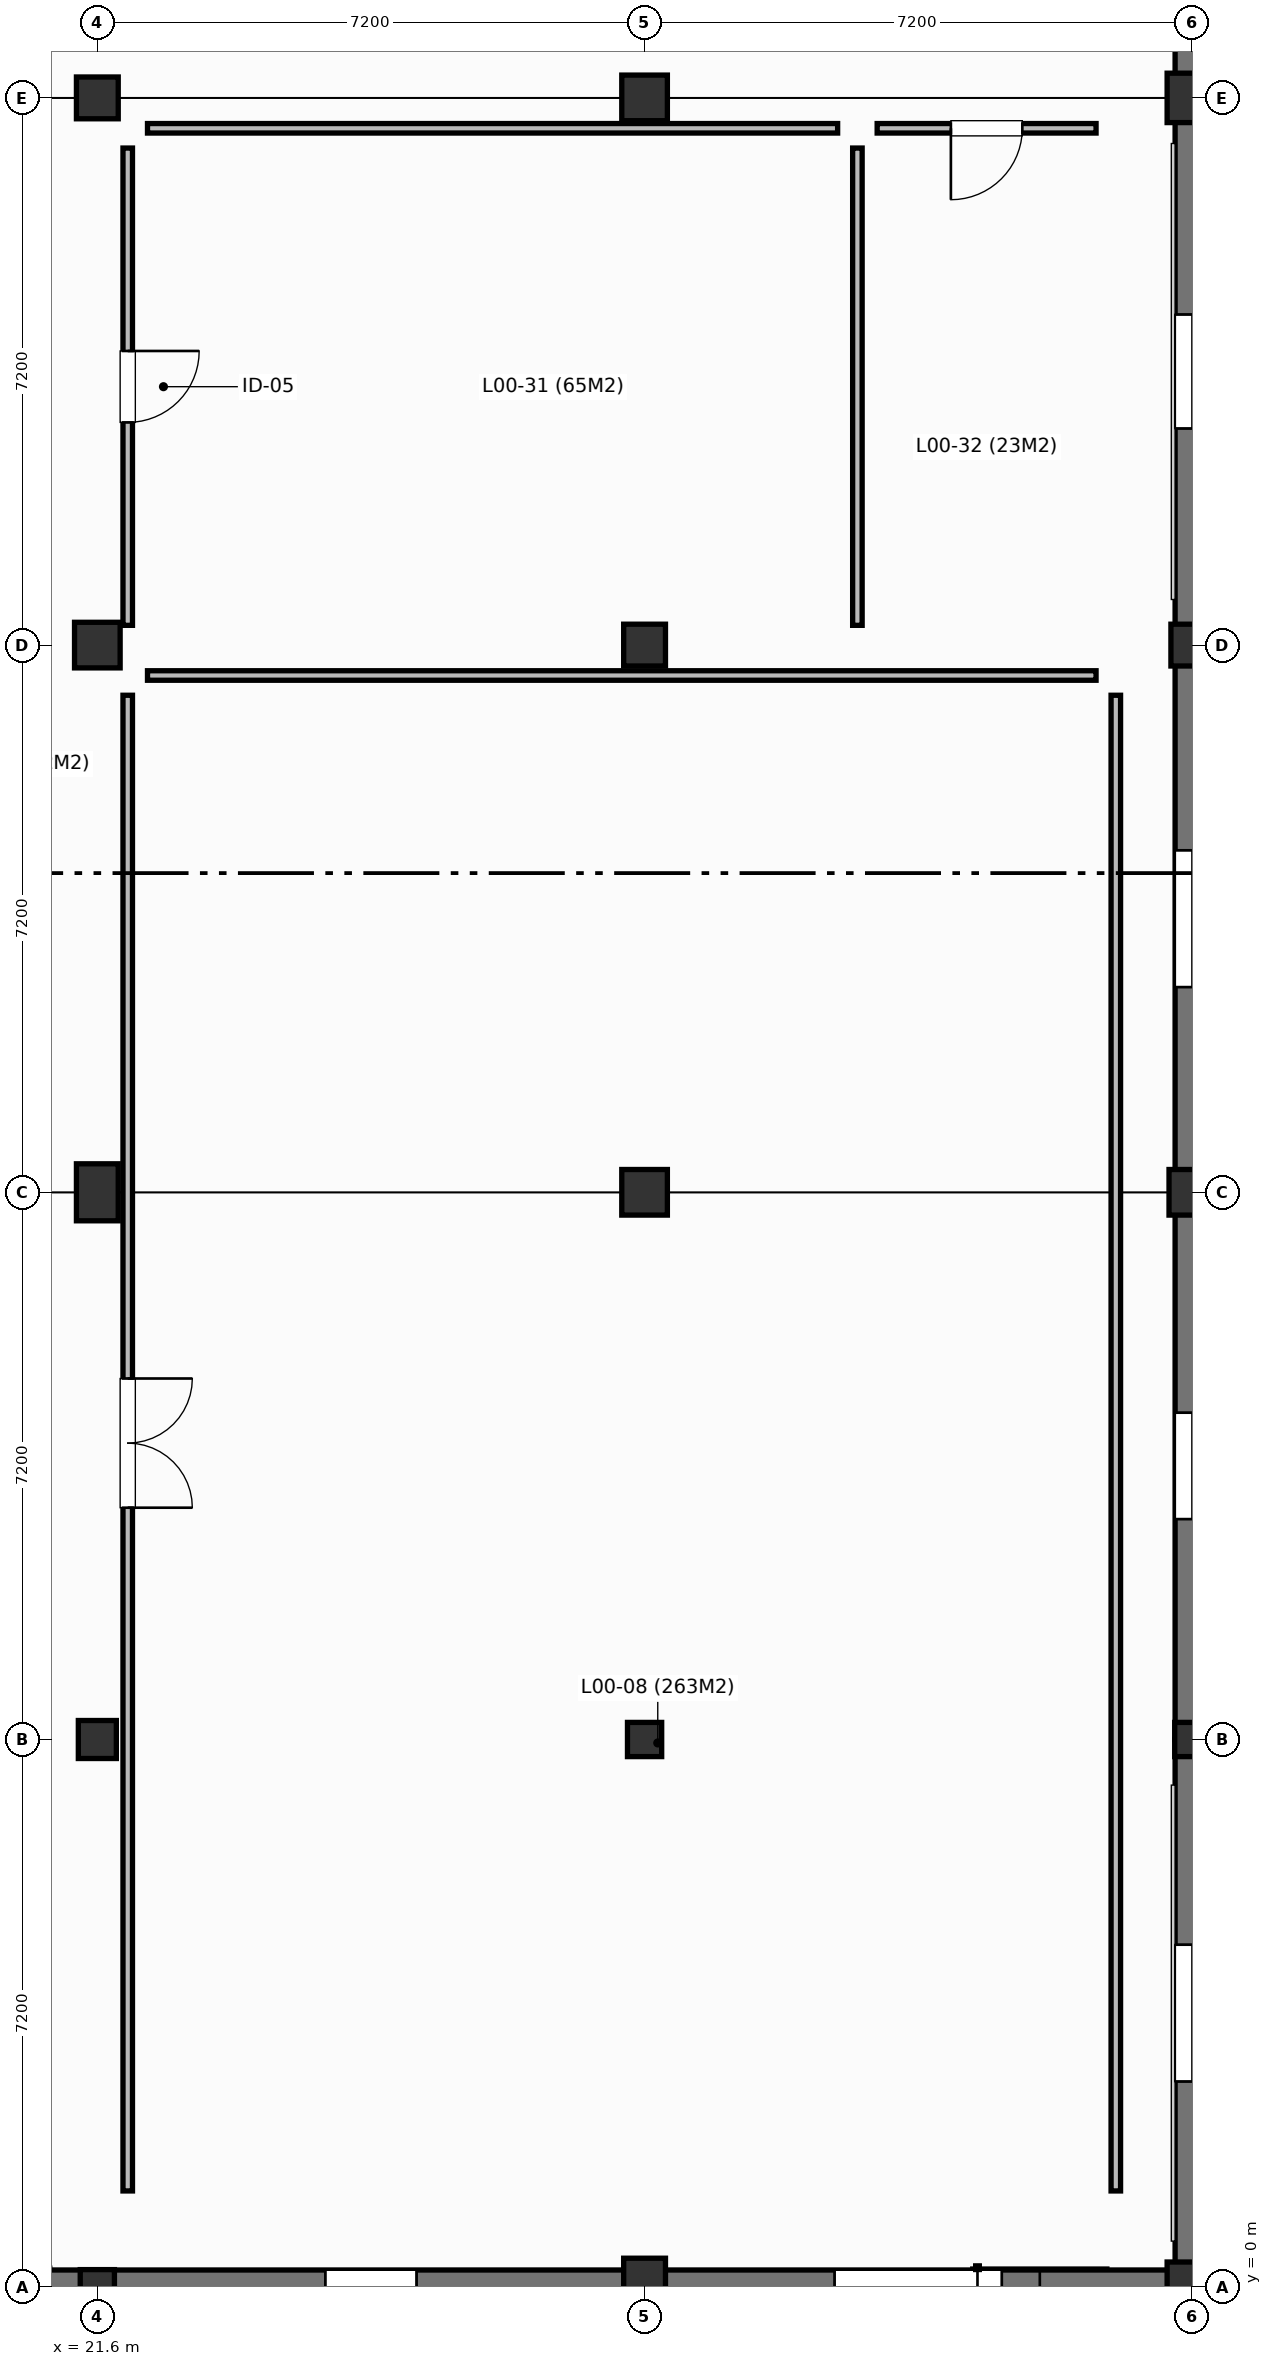
"""IFC4 building model, lengths in metres.
Left out: names, types, materials, properties, quantities, classifications, styles, units other than length and angle.
Written with IfcOpenShell. Run it as: python <this file> out.ifc"""

import sys

from ifc_helpers import new_model, si_unit, direction, frame, frame_2d, origin, origin_2d, place, context, subcontext, project, spatial, rectangle, circle, extrude, element, fill, save


model = new_model("IFC4")
c1 = context("Model", 3, precision=1e-05, world=origin(), true_north=direction((0.0, 1.0)))
c2 = subcontext(c1, "Body", "Model", "MODEL_VIEW")
j1 = project(units=[si_unit("LENGTHUNIT", "METRE"), si_unit("PLANEANGLEUNIT", "RADIAN")], contexts=[c1])
p1 = place(None, origin())
s1 = spatial("IfcSite", under=j1, at=p1, CompositionType="ELEMENT")
p2 = place(p1, origin())
s2 = spatial("IfcBuilding", under=s1, at=p2, CompositionType="ELEMENT")
p3 = place(p2, origin())
s3 = spatial("IfcBuildingStorey", under=s2, at=p3, CompositionType="ELEMENT", Elevation=0.0)
p4 = place(p3, frame((21.6, 0.0, 0.0), z_axis=(0.0, 0.0, 1.0), x_axis=(1.0, 0.0, 0.0)))
e1 = element("IfcColumn", 1, at=p4, inside=s3, PredefinedType="COLUMN", context=c2, shape_type="SweptSolid", body=[
    extrude(rectangle(XDim=0.45, YDim=0.45, at=origin_2d()), origin(), (0.0, 0.0, 1.0), 4.8),
])
p5 = place(p3, frame((21.6, 7.2, 0.0), z_axis=(0.0, 0.0, 1.0), x_axis=(1.0, 0.0, 0.0)))
e2 = element("IfcColumn", 2, at=p5, inside=s3, PredefinedType="COLUMN", context=c2, shape_type="SweptSolid", body=[
    extrude(rectangle(XDim=0.5, YDim=0.5, at=origin_2d()), origin(), (0.0, 0.0, 1.0), 4.8),
])
p6 = place(p3, frame((21.6, 14.4, 0.0), z_axis=(0.0, 0.0, 1.0), x_axis=(1.0, 0.0, 0.0)))
e3 = element("IfcColumn", 3, at=p6, inside=s3, PredefinedType="COLUMN", context=c2, shape_type="SweptSolid", body=[
    extrude(rectangle(XDim=0.55, YDim=0.75, at=origin_2d()), origin(), (0.0, 0.0, 1.0), 4.8),
])
p7 = place(p3, frame((21.6, 21.6, 0.0), z_axis=(0.0, 0.0, 1.0), x_axis=(1.0, 0.0, 0.0)))
e4 = element("IfcColumn", 4, at=p7, inside=s3, PredefinedType="COLUMN", context=c2, shape_type="SweptSolid", body=[
    extrude(rectangle(XDim=0.6, YDim=0.6, at=origin_2d()), origin(), (0.0, 0.0, 1.0), 4.8),
])
p8 = place(p3, frame((21.6, 28.8, 0.0), z_axis=(0.0, 0.0, 1.0), x_axis=(1.0, 0.0, 0.0)))
e5 = element("IfcColumn", 5, at=p8, inside=s3, PredefinedType="COLUMN", context=c2, shape_type="SweptSolid", body=[
    extrude(rectangle(XDim=0.55, YDim=0.55, at=origin_2d()), origin(), (0.0, 0.0, 1.0), 4.8),
])
p9 = place(p3, frame((28.8, 0.0, 0.0), z_axis=(0.0, 0.0, 1.0), x_axis=(1.0, 0.0, 0.0)))
e6 = element("IfcColumn", 6, at=p9, inside=s3, PredefinedType="COLUMN", context=c2, shape_type="SweptSolid", body=[
    extrude(rectangle(XDim=0.55, YDim=0.75, at=origin_2d()), origin(), (0.0, 0.0, 1.0), 4.8),
])
p10 = place(p3, frame((28.8, 7.2, 0.0), z_axis=(0.0, 0.0, 1.0), x_axis=(1.0, 0.0, 0.0)))
e7 = element("IfcColumn", 7, at=p10, inside=s3, PredefinedType="COLUMN", context=c2, shape_type="SweptSolid", body=[
    extrude(rectangle(XDim=0.45, YDim=0.45, at=origin_2d()), origin(), (0.0, 0.0, 1.0), 4.8),
])
p11 = place(p3, frame((28.8, 14.4, 0.0), z_axis=(0.0, 0.0, 1.0), x_axis=(1.0, 0.0, 0.0)))
e8 = element("IfcColumn", 8, at=p11, inside=s3, PredefinedType="COLUMN", context=c2, shape_type="SweptSolid", body=[
    extrude(rectangle(XDim=0.6, YDim=0.6, at=origin_2d()), origin(), (0.0, 0.0, 1.0), 4.8),
])
p12 = place(p3, frame((28.8, 21.6, 0.0), z_axis=(0.0, 0.0, 1.0), x_axis=(1.0, 0.0, 0.0)))
e9 = element("IfcColumn", 9, at=p12, inside=s3, PredefinedType="COLUMN", context=c2, shape_type="SweptSolid", body=[
    extrude(rectangle(XDim=0.55, YDim=0.55, at=origin_2d()), origin(), (0.0, 0.0, 1.0), 4.8),
])
p13 = place(p3, frame((28.8, 28.8, 0.0), z_axis=(0.0, 0.0, 1.0), x_axis=(1.0, 0.0, 0.0)))
e10 = element("IfcColumn", 10, at=p13, inside=s3, PredefinedType="COLUMN", context=c2, shape_type="SweptSolid", body=[
    extrude(rectangle(XDim=0.6, YDim=0.6, at=origin_2d()), origin(), (0.0, 0.0, 1.0), 4.8),
])
p14 = place(p3, frame((36.0, 0.0, 0.0), z_axis=(0.0, 0.0, 1.0), x_axis=(1.0, 0.0, 0.0)))
e11 = element("IfcColumn", 11, at=p14, inside=s3, PredefinedType="COLUMN", context=c2, shape_type="SweptSolid", body=[
    extrude(circle(Radius=0.325, at=origin_2d()), origin(), (0.0, 0.0, 1.0), 4.8),
])
p15 = place(p3, frame((36.0, 7.2, 0.0), z_axis=(0.0, 0.0, 1.0), x_axis=(1.0, 0.0, 0.0)))
e12 = element("IfcColumn", 12, at=p15, inside=s3, PredefinedType="COLUMN", context=c2, shape_type="SweptSolid", body=[
    extrude(rectangle(XDim=0.45, YDim=0.45, at=origin_2d()), origin(), (0.0, 0.0, 1.0), 4.8),
])
p16 = place(p3, frame((36.0, 14.4, 0.0), z_axis=(0.0, 0.0, 1.0), x_axis=(1.0, 0.0, 0.0)))
e13 = element("IfcColumn", 13, at=p16, inside=s3, PredefinedType="COLUMN", context=c2, shape_type="SweptSolid", body=[
    extrude(rectangle(XDim=0.6, YDim=0.6, at=origin_2d()), origin(), (0.0, 0.0, 1.0), 4.8),
])
p17 = place(p3, frame((36.0, 21.6, 0.0), z_axis=(0.0, 0.0, 1.0), x_axis=(1.0, 0.0, 0.0)))
e14 = element("IfcColumn", 14, at=p17, inside=s3, PredefinedType="COLUMN", context=c2, shape_type="SweptSolid", body=[
    extrude(rectangle(XDim=0.55, YDim=0.55, at=origin_2d()), origin(), (0.0, 0.0, 1.0), 4.8),
])
p18 = place(p3, frame((36.0, 28.8, 0.0), z_axis=(0.0, 0.0, 1.0), x_axis=(1.0, 0.0, 0.0)))
e15 = element("IfcColumn", 15, at=p18, inside=s3, PredefinedType="COLUMN", context=c2, shape_type="SweptSolid", body=[
    extrude(circle(Radius=0.325, at=origin_2d()), origin(), (0.0, 0.0, 1.0), 4.8),
])
p19 = place(p3, frame((36.0, 36.0, 0.0), z_axis=(0.0, 0.0, 1.0), x_axis=(0.0, -1.0, 0.0)))
e16 = element("IfcWall", 16, at=p19, inside=s3, PredefinedType="STANDARD", context=c2, shape_type="SweptSolid", body=[
    extrude(rectangle(XDim=7.2, YDim=0.44, at=frame_2d((3.6, 0.0))), origin(), (0.0, 0.0, 1.0), 4.44),
])
p20 = place(p19, frame((3.0, 0.0, 0.8)))
e17 = element("IfcOpeningElement", 17, at=p20, cuts=e16, PredefinedType="OPENING", context=c2, shape_type="SweptSolid", body=[
    extrude(rectangle(XDim=1.2, YDim=1.65, at=frame_2d((0.6, 0.825))), frame((0.0, 0.23, 0.0), z_axis=(0.0, -1.0, 0.0), x_axis=(1.0, 0.0, 0.0)), (0.0, 0.0, 1.0), 0.46),
])
p21 = place(p3, frame((36.0, 28.8, 0.0), z_axis=(0.0, 0.0, 1.0), x_axis=(0.0, -1.0, 0.0)))
e18 = element("IfcWall", 18, at=p21, inside=s3, PredefinedType="STANDARD", context=c2, shape_type="SweptSolid", body=[
    extrude(rectangle(XDim=7.2, YDim=0.44, at=frame_2d((3.6, 0.0))), origin(), (0.0, 0.0, 1.0), 4.44),
])
p22 = place(p21, frame((2.85, 0.0, 0.8)))
e19 = element("IfcOpeningElement", 19, at=p22, cuts=e18, PredefinedType="OPENING", context=c2, shape_type="SweptSolid", body=[
    extrude(rectangle(XDim=1.5, YDim=1.65, at=frame_2d((0.75, 0.825))), frame((0.0, 0.23, 0.0), z_axis=(0.0, -1.0, 0.0), x_axis=(1.0, 0.0, 0.0)), (0.0, 0.0, 1.0), 0.46),
])
p23 = place(p3, frame((36.0, 21.6, 0.0), z_axis=(0.0, 0.0, 1.0), x_axis=(0.0, -1.0, 0.0)))
e20 = element("IfcWall", 20, at=p23, inside=s3, PredefinedType="STANDARD", context=c2, shape_type="SweptSolid", body=[
    extrude(rectangle(XDim=7.2, YDim=0.44, at=frame_2d((3.6, 0.0))), origin(), (0.0, 0.0, 1.0), 4.44),
])
p24 = place(p23, frame((2.7, 0.0, 0.8)))
e21 = element("IfcOpeningElement", 21, at=p24, cuts=e20, PredefinedType="OPENING", context=c2, shape_type="SweptSolid", body=[
    extrude(rectangle(XDim=1.8, YDim=1.65, at=frame_2d((0.9, 0.825))), frame((0.0, 0.23, 0.0), z_axis=(0.0, -1.0, 0.0), x_axis=(1.0, 0.0, 0.0)), (0.0, 0.0, 1.0), 0.46),
])
p25 = place(p3, frame((36.0, 14.4, 0.0), z_axis=(0.0, 0.0, 1.0), x_axis=(0.0, -1.0, 0.0)))
e22 = element("IfcWall", 22, at=p25, inside=s3, PredefinedType="STANDARD", context=c2, shape_type="SweptSolid", body=[
    extrude(rectangle(XDim=7.2, YDim=0.44, at=frame_2d((3.6, 0.0))), origin(), (0.0, 0.0, 1.0), 4.44),
])
p26 = place(p25, frame((2.9, 0.0, 0.8)))
e23 = element("IfcOpeningElement", 23, at=p26, cuts=e22, PredefinedType="OPENING", context=c2, shape_type="SweptSolid", body=[
    extrude(rectangle(XDim=1.4, YDim=2.05, at=frame_2d((0.7, 1.025))), frame((0.0, 0.23, 0.0), z_axis=(0.0, -1.0, 0.0), x_axis=(1.0, 0.0, 0.0)), (0.0, 0.0, 1.0), 0.46),
])
p27 = place(p3, frame((36.0, 7.2, 0.0), z_axis=(0.0, 0.0, 1.0), x_axis=(0.0, -1.0, 0.0)))
e24 = element("IfcWall", 24, at=p27, inside=s3, PredefinedType="STANDARD", context=c2, shape_type="SweptSolid", body=[
    extrude(rectangle(XDim=7.2, YDim=0.44, at=frame_2d((3.6, 0.0))), origin(), (0.0, 0.0, 1.0), 4.44),
])
p28 = place(p27, frame((2.7, 0.0, 0.8)))
e25 = element("IfcOpeningElement", 25, at=p28, cuts=e24, PredefinedType="OPENING", context=c2, shape_type="SweptSolid", body=[
    extrude(rectangle(XDim=1.8, YDim=2.05, at=frame_2d((0.9, 1.025))), frame((0.0, 0.23, 0.0), z_axis=(0.0, -1.0, 0.0), x_axis=(1.0, 0.0, 0.0)), (0.0, 0.0, 1.0), 0.46),
])
p29 = place(p3, frame((36.0, 0.0, 0.0), z_axis=(0.0, 0.0, 1.0), x_axis=(-1.0, 0.0, 0.0)))
e26 = element("IfcWall", 26, at=p29, inside=s3, PredefinedType="STANDARD", context=c2, shape_type="SweptSolid", body=[
    extrude(rectangle(XDim=7.2, YDim=0.44, at=frame_2d((3.6, 0.0))), origin(), (0.0, 0.0, 1.0), 4.44),
])
p30 = place(p29, frame((2.5, 0.0, 0.8)))
e27 = element("IfcOpeningElement", 27, at=p30, cuts=e26, PredefinedType="OPENING", context=c2, shape_type="SweptSolid", body=[
    extrude(rectangle(XDim=2.2, YDim=2.05, at=frame_2d((1.1, 1.025))), frame((0.0, 0.23, 0.0), z_axis=(0.0, -1.0, 0.0), x_axis=(1.0, 0.0, 0.0)), (0.0, 0.0, 1.0), 0.46),
])
p31 = place(p3, frame((28.8, 0.0, 0.0), z_axis=(0.0, 0.0, 1.0), x_axis=(-1.0, 0.0, 0.0)))
e28 = element("IfcWall", 28, at=p31, inside=s3, PredefinedType="STANDARD", context=c2, shape_type="SweptSolid", body=[
    extrude(rectangle(XDim=7.2, YDim=0.44, at=frame_2d((3.6, 0.0))), origin(), (0.0, 0.0, 1.0), 4.44),
])
p32 = place(p31, frame((3.0, 0.0, 0.8)))
e29 = element("IfcOpeningElement", 29, at=p32, cuts=e28, PredefinedType="OPENING", context=c2, shape_type="SweptSolid", body=[
    extrude(rectangle(XDim=1.2, YDim=1.65, at=frame_2d((0.6, 0.825))), frame((0.0, 0.23, 0.0), z_axis=(0.0, -1.0, 0.0), x_axis=(1.0, 0.0, 0.0)), (0.0, 0.0, 1.0), 0.46),
])
p33 = place(p3, frame((21.6, 0.0, 0.0), z_axis=(0.0, 0.0, 1.0), x_axis=(-1.0, 0.0, 0.0)))
e30 = element("IfcWall", 30, at=p33, inside=s3, PredefinedType="STANDARD", context=c2, shape_type="SweptSolid", body=[
    extrude(rectangle(XDim=7.2, YDim=0.44, at=frame_2d((3.6, 0.0))), origin(), (0.0, 0.0, 1.0), 4.44),
])
p34 = place(p33, frame((2.85, 0.0, 0.8)))
e31 = element("IfcOpeningElement", 31, at=p34, cuts=e30, PredefinedType="OPENING", context=c2, shape_type="SweptSolid", body=[
    extrude(rectangle(XDim=1.5, YDim=1.65, at=frame_2d((0.75, 0.825))), frame((0.0, 0.23, 0.0), z_axis=(0.0, -1.0, 0.0), x_axis=(1.0, 0.0, 0.0)), (0.0, 0.0, 1.0), 0.46),
])
p35 = place(p3, frame((35.0, 1.26, 0.0), z_axis=(0.0, 0.0, 1.0), x_axis=(0.0, 1.0, 0.0)))
e32 = element("IfcWall", 32, at=p35, inside=s3, PredefinedType="PARTITIONING", context=c2, shape_type="SweptSolid", body=[
    extrude(rectangle(XDim=19.68, YDim=0.125, at=frame_2d((9.84, 0.0))), origin(), (0.0, 0.0, 1.0), 4.44),
])
p36 = place(p3, frame((34.74, 21.2, 0.0), z_axis=(0.0, 0.0, 1.0), x_axis=(-1.0, 0.0, 0.0)))
e33 = element("IfcWall", 33, at=p36, inside=s3, PredefinedType="PARTITIONING", context=c2, shape_type="SweptSolid", body=[
    extrude(rectangle(XDim=12.48, YDim=0.125, at=frame_2d((6.24, 0.0))), origin(), (0.0, 0.0, 1.0), 3.515),
])
p37 = place(p3, frame((22.0, 20.94, 0.0), z_axis=(0.0, 0.0, 1.0), x_axis=(0.0, -1.0, 0.0)))
e34 = element("IfcWall", 34, at=p37, inside=s3, PredefinedType="PARTITIONING", context=c2, shape_type="SweptSolid", body=[
    extrude(rectangle(XDim=19.68, YDim=0.125, at=frame_2d((9.84, 0.0))), origin(), (0.0, 0.0, 1.0), 3.465),
])
p38 = place(p37, frame((8.99, 0.0, 0.0)))
e35 = element("IfcOpeningElement", 35, at=p38, cuts=e34, PredefinedType="OPENING", context=c2, shape_type="SweptSolid", body=[
    extrude(rectangle(XDim=1.7, YDim=2.2, at=frame_2d((0.85, 1.1))), frame((0.0, 0.073, 0.0), z_axis=(0.0, -1.0, 0.0), x_axis=(1.0, 0.0, 0.0)), (0.0, 0.0, 1.0), 0.145),
])
p39 = place(p3, frame((31.6, 21.86, 0.0), z_axis=(0.0, 0.0, 1.0), x_axis=(0.0, 1.0, 0.0)))
e36 = element("IfcWall", 36, at=p39, inside=s3, PredefinedType="PARTITIONING", context=c2, shape_type="SweptSolid", body=[
    extrude(rectangle(XDim=6.28, YDim=0.125, at=frame_2d((3.14, 0.0))), origin(), (0.0, 0.0, 1.0), 4.44),
])
p40 = place(p3, frame((31.34, 28.4, 0.0), z_axis=(0.0, 0.0, 1.0), x_axis=(-1.0, 0.0, 0.0)))
e37 = element("IfcWall", 37, at=p40, inside=s3, PredefinedType="PARTITIONING", context=c2, shape_type="SweptSolid", body=[
    extrude(rectangle(XDim=9.08, YDim=0.125, at=frame_2d((4.54, 0.0))), origin(), (0.0, 0.0, 1.0), 3.515),
])
p41 = place(p3, frame((22.0, 28.14, 0.0), z_axis=(0.0, 0.0, 1.0), x_axis=(0.0, -1.0, 0.0)))
e38 = element("IfcWall", 38, at=p41, inside=s3, PredefinedType="PARTITIONING", context=c2, shape_type="SweptSolid", body=[
    extrude(rectangle(XDim=6.28, YDim=0.125, at=frame_2d((3.14, 0.0))), origin(), (0.0, 0.0, 1.0), 3.365),
])
p42 = place(p41, frame((2.67, 0.0, 0.0)))
e39 = element("IfcOpeningElement", 39, at=p42, cuts=e38, PredefinedType="OPENING", context=c2, shape_type="SweptSolid", body=[
    extrude(rectangle(XDim=0.94, YDim=2.1, at=frame_2d((0.47, 1.05))), frame((0.0, 0.073, 0.0), z_axis=(0.0, -1.0, 0.0), x_axis=(1.0, 0.0, 0.0)), (0.0, 0.0, 1.0), 0.145),
])
p43 = place(p3, frame((34.74, 28.4, 0.0), z_axis=(0.0, 0.0, 1.0), x_axis=(-1.0, 0.0, 0.0)))
e40 = element("IfcWall", 40, at=p43, inside=s3, PredefinedType="PARTITIONING", context=c2, shape_type="SweptSolid", body=[
    extrude(rectangle(XDim=2.88, YDim=0.125, at=frame_2d((1.44, 0.0))), origin(), (0.0, 0.0, 1.0), 3.815),
])
p44 = place(p43, frame((0.97, 0.0, 0.0)))
e41 = element("IfcOpeningElement", 41, at=p44, cuts=e40, PredefinedType="OPENING", context=c2, shape_type="SweptSolid", body=[
    extrude(rectangle(XDim=0.94, YDim=2.1, at=frame_2d((0.47, 1.05))), frame((0.0, 0.073, 0.0), z_axis=(0.0, -1.0, 0.0), x_axis=(1.0, 0.0, 0.0)), (0.0, 0.0, 1.0), 0.145),
])
p45 = place(p22, origin())
e42 = element("IfcWindow", 42, at=p45, inside=s3, PartitioningType="SINGLE_PANEL", PredefinedType="WINDOW", context=c2, shape_type="SweptSolid", body=[
    extrude(rectangle(XDim=1.5, YDim=1.65, at=frame_2d((0.75, 0.825))), frame((0.0, 0.03, 0.0), z_axis=(0.0, -1.0, 0.0), x_axis=(1.0, 0.0, 0.0)), (0.0, 0.0, 1.0), 0.06),
])
fill(e19, e42)
p46 = place(p24, origin())
e43 = element("IfcWindow", 43, at=p46, inside=s3, PartitioningType="SINGLE_PANEL", PredefinedType="WINDOW", context=c2, shape_type="SweptSolid", body=[
    extrude(rectangle(XDim=1.8, YDim=1.65, at=frame_2d((0.9, 0.825))), frame((0.0, 0.03, 0.0), z_axis=(0.0, -1.0, 0.0), x_axis=(1.0, 0.0, 0.0)), (0.0, 0.0, 1.0), 0.06),
])
fill(e21, e43)
p47 = place(p26, origin())
e44 = element("IfcWindow", 44, at=p47, inside=s3, PartitioningType="SINGLE_PANEL", PredefinedType="WINDOW", context=c2, shape_type="SweptSolid", body=[
    extrude(rectangle(XDim=1.4, YDim=2.05, at=frame_2d((0.7, 1.025))), frame((0.0, 0.03, 0.0), z_axis=(0.0, -1.0, 0.0), x_axis=(1.0, 0.0, 0.0)), (0.0, 0.0, 1.0), 0.06),
])
fill(e23, e44)
p48 = place(p28, origin())
e45 = element("IfcWindow", 45, at=p48, inside=s3, PartitioningType="SINGLE_PANEL", PredefinedType="WINDOW", context=c2, shape_type="SweptSolid", body=[
    extrude(rectangle(XDim=1.8, YDim=2.05, at=frame_2d((0.9, 1.025))), frame((0.0, 0.03, 0.0), z_axis=(0.0, -1.0, 0.0), x_axis=(1.0, 0.0, 0.0)), (0.0, 0.0, 1.0), 0.06),
])
fill(e25, e45)
p49 = place(p30, origin())
e46 = element("IfcWindow", 46, at=p49, inside=s3, PartitioningType="SINGLE_PANEL", PredefinedType="WINDOW", context=c2, shape_type="SweptSolid", body=[
    extrude(rectangle(XDim=2.2, YDim=2.05, at=frame_2d((1.1, 1.025))), frame((0.0, 0.03, 0.0), z_axis=(0.0, -1.0, 0.0), x_axis=(1.0, 0.0, 0.0)), (0.0, 0.0, 1.0), 0.06),
])
fill(e27, e46)
p50 = place(p32, origin())
e47 = element("IfcWindow", 47, at=p50, inside=s3, PartitioningType="SINGLE_PANEL", PredefinedType="WINDOW", context=c2, shape_type="SweptSolid", body=[
    extrude(rectangle(XDim=1.2, YDim=1.65, at=frame_2d((0.6, 0.825))), frame((0.0, 0.03, 0.0), z_axis=(0.0, -1.0, 0.0), x_axis=(1.0, 0.0, 0.0)), (0.0, 0.0, 1.0), 0.06),
])
fill(e29, e47)
p51 = place(p38, origin())
e48 = element("IfcDoor", 48, at=p51, inside=s3, OperationType="DOUBLE_DOOR_SINGLE_SWING", PredefinedType="DOOR", context=c2, shape_type="SweptSolid", body=[
    extrude(rectangle(XDim=1.7, YDim=2.2, at=frame_2d((0.85, 1.1))), frame((0.0, 0.025, 0.0), z_axis=(0.0, -1.0, 0.0), x_axis=(1.0, 0.0, 0.0)), (0.0, 0.0, 1.0), 0.05),
])
fill(e35, e48)
p52 = place(p42, origin())
e49 = element("IfcDoor", 49, at=p52, inside=s3, OperationType="SINGLE_SWING_LEFT", PredefinedType="DOOR", context=c2, shape_type="SweptSolid", body=[
    extrude(rectangle(XDim=0.94, YDim=2.1, at=frame_2d((0.47, 1.05))), frame((0.0, 0.025, 0.0), z_axis=(0.0, -1.0, 0.0), x_axis=(1.0, 0.0, 0.0)), (0.0, 0.0, 1.0), 0.05),
])
fill(e39, e49)
p53 = place(p44, origin())
e50 = element("IfcDoor", 50, at=p53, inside=s3, OperationType="SINGLE_SWING_RIGHT", PredefinedType="DOOR", context=c2, shape_type="SweptSolid", body=[
    extrude(rectangle(XDim=0.94, YDim=2.1, at=frame_2d((0.47, 1.05))), frame((0.0, 0.025, 0.0), z_axis=(0.0, -1.0, 0.0), x_axis=(1.0, 0.0, 0.0)), (0.0, 0.0, 1.0), 0.05),
])
fill(e41, e50)
save(model, sys.argv[1])
